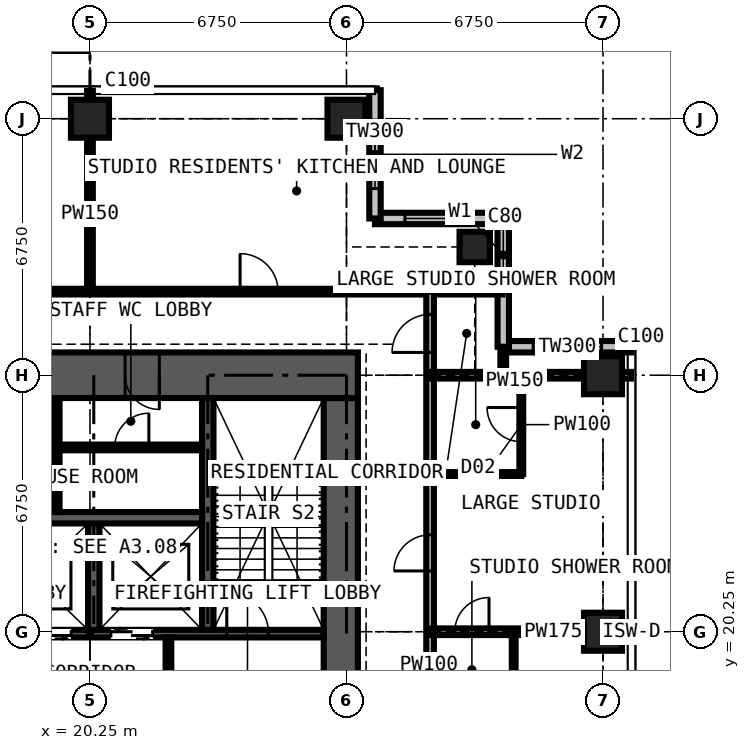
"""IFC4 building model, lengths in metres.
Left out: names, types, materials, properties, quantities, classifications, styles, units other than length and angle.
Written with IfcOpenShell. Run it as: python <this file> out.ifc"""

import sys

from ifc_helpers import new_model, si_unit, direction, frame, frame_2d, origin, origin_2d, place, context, subcontext, project, spatial, rectangle, extrude, element, fill, save


model = new_model("IFC4")
c1 = context("Model", 3, precision=1e-05, world=origin(), true_north=direction((0.0, 1.0)))
c2 = subcontext(c1, "Body", "Model", "MODEL_VIEW")
j1 = project(units=[si_unit("LENGTHUNIT", "METRE"), si_unit("PLANEANGLEUNIT", "RADIAN")], contexts=[c1])
p1 = place(None, origin())
s1 = spatial("IfcSite", under=j1, at=p1, CompositionType="ELEMENT")
p2 = place(p1, origin())
s2 = spatial("IfcBuilding", under=s1, at=p2, CompositionType="ELEMENT")
p3 = place(p2, frame((0.0, 0.0, 229.5)))
s3 = spatial("IfcBuildingStorey", under=s2, at=p3, CompositionType="ELEMENT", Elevation=229.5)
for number, where, z_axis, x_axis in (
    (1, (20.25, 33.75, 0.0), (0.0, 0.0, 1.0), (1.0, 0.0, 0.0)),
    (2, (27.0, 33.75, 0.0), (0.0, 0.0, 1.0), (1.0, 0.0, 0.0)),
):
    element("IfcColumn", number, at=place(p3, frame(where, z_axis=z_axis, x_axis=x_axis)), inside=s3, PredefinedType="COLUMN", context=c2, shape_type="SweptSolid", body=[
        extrude(rectangle(XDim=1.0, YDim=1.0, at=origin_2d()), origin(), (0.0, 0.0, 1.0), 3.6),
    ])
p4 = place(p3, frame((30.375, 30.375, 0.0), z_axis=(0.0, 0.0, 1.0), x_axis=(1.0, 0.0, 0.0)))
e3 = element("IfcColumn", 3, at=p4, inside=s3, PredefinedType="COLUMN", context=c2, shape_type="SweptSolid", body=[
    extrude(rectangle(XDim=0.8, YDim=0.8, at=origin_2d()), origin(), (0.0, 0.0, 1.0), 3.6),
])
for number, where, z_axis, x_axis in (
    (4, (33.75, 20.25, 0.0), (0.0, 0.0, 1.0), (1.0, 0.0, 0.0)),
    (5, (33.75, 27.0, 0.0), (0.0, 0.0, 1.0), (1.0, 0.0, 0.0)),
):
    element("IfcColumn", number, at=place(p3, frame(where, z_axis=z_axis, x_axis=x_axis)), inside=s3, PredefinedType="COLUMN", context=c2, shape_type="SweptSolid", body=[
        extrude(rectangle(XDim=1.0, YDim=1.0, at=origin_2d()), origin(), (0.0, 0.0, 1.0), 3.6),
    ])
p5 = place(p3, frame((26.85, 14.1, 0.0), z_axis=(0.0, 0.0, 1.0), x_axis=(0.0, 1.0, 0.0)))
e6 = element("IfcWall", 6, at=p5, inside=s3, PredefinedType="SHEAR", context=c2, shape_type="SweptSolid", body=[
    extrude(rectangle(XDim=12.3, YDim=0.9, at=frame_2d((6.15, 0.0))), origin(), (0.0, 0.0, 1.0), 3.6),
])
p6 = place(p5, frame((3.65, 0.0, 0.0)))
e7 = element("IfcOpeningElement", 7, at=p6, cuts=e6, PredefinedType="OPENING", context=c2, shape_type="SweptSolid", body=[
    extrude(rectangle(XDim=1.2, YDim=2.2, at=frame_2d((0.6, 1.1))), frame((0.0, 0.46, 0.0), z_axis=(0.0, -1.0, 0.0), x_axis=(1.0, 0.0, 0.0)), (0.0, 0.0, 1.0), 0.92),
])
p7 = place(p3, frame((27.3, 27.0, 0.0), z_axis=(0.0, 0.0, 1.0), x_axis=(-1.0, 0.0, 0.0)))
e8 = element("IfcWall", 8, at=p7, inside=s3, PredefinedType="SHEAR", context=c2, shape_type="SweptSolid", body=[
    extrude(rectangle(XDim=14.1, YDim=1.2, at=frame_2d((7.05, 0.0))), origin(), (0.0, 0.0, 1.0), 3.6),
])
p8 = place(p7, frame((5.225, 0.0, 0.0)))
e9 = element("IfcOpeningElement", 9, at=p8, cuts=e8, PredefinedType="OPENING", context=c2, shape_type="SweptSolid", body=[
    extrude(rectangle(XDim=0.9, YDim=2.2, at=frame_2d((0.45, 1.1))), frame((0.0, 0.61, 0.0), z_axis=(0.0, -1.0, 0.0), x_axis=(1.0, 0.0, 0.0)), (0.0, 0.0, 1.0), 1.22),
])
p9 = place(p7, frame((8.2, 0.0, 0.0)))
e10 = element("IfcOpeningElement", 10, at=p9, cuts=e8, PredefinedType="OPENING", context=c2, shape_type="SweptSolid", body=[
    extrude(rectangle(XDim=1.0, YDim=2.2, at=frame_2d((0.5, 1.1))), frame((0.0, 0.61, 0.0), z_axis=(0.0, -1.0, 0.0), x_axis=(1.0, 0.0, 0.0)), (0.0, 0.0, 1.0), 1.22),
])
p10 = place(p3, frame((34.5, 27.75, 0.0), z_axis=(0.0, 0.0, 1.0), x_axis=(-1.0, 0.0, 0.0)))
e11 = element("IfcWall", 11, at=p10, inside=s3, PredefinedType="SOLIDWALL", context=c2, shape_type="SweptSolid", body=[
    extrude(rectangle(XDim=3.375, YDim=0.3, at=frame_2d((1.688, 0.0))), origin(), (0.0, 0.0, 1.0), 3.375),
])
p11 = place(p10, frame((0.788, 0.0, 0.6)))
e12 = element("IfcOpeningElement", 12, at=p11, cuts=e11, PredefinedType="OPENING", context=c2, shape_type="SweptSolid", body=[
    extrude(rectangle(XDim=1.8, YDim=2.1, at=frame_2d((0.9, 1.05))), frame((0.0, 0.16, 0.0), z_axis=(0.0, -1.0, 0.0), x_axis=(1.0, 0.0, 0.0)), (0.0, 0.0, 1.0), 0.32),
])
p12 = place(p3, frame((31.125, 27.75, 0.0), z_axis=(0.0, 0.0, 1.0), x_axis=(0.0, 1.0, 0.0)))
e13 = element("IfcWall", 13, at=p12, inside=s3, PredefinedType="SOLIDWALL", context=c2, shape_type="SweptSolid", body=[
    extrude(rectangle(XDim=3.375, YDim=0.3, at=frame_2d((1.688, 0.0))), origin(), (0.0, 0.0, 1.0), 3.375),
])
p13 = place(p12, frame((1.663, 0.0, 0.9)))
e14 = element("IfcOpeningElement", 14, at=p13, cuts=e13, PredefinedType="OPENING", context=c2, shape_type="SweptSolid", body=[
    extrude(rectangle(XDim=1.5, YDim=1.8, at=frame_2d((0.75, 0.9))), frame((0.0, 0.16, 0.0), z_axis=(0.0, -1.0, 0.0), x_axis=(1.0, 0.0, 0.0)), (0.0, 0.0, 1.0), 0.32),
])
p14 = place(p3, frame((31.125, 31.125, 0.0), z_axis=(0.0, 0.0, 1.0), x_axis=(-1.0, 0.0, 0.0)))
e15 = element("IfcWall", 15, at=p14, inside=s3, PredefinedType="SOLIDWALL", context=c2, shape_type="SweptSolid", body=[
    extrude(rectangle(XDim=3.375, YDim=0.3, at=frame_2d((1.688, 0.0))), origin(), (0.0, 0.0, 1.0), 3.375),
])
p15 = place(p14, frame((0.788, 0.0, 0.6)))
e16 = element("IfcOpeningElement", 16, at=p15, cuts=e15, PredefinedType="OPENING", context=c2, shape_type="SweptSolid", body=[
    extrude(rectangle(XDim=1.8, YDim=2.1, at=frame_2d((0.9, 1.05))), frame((0.0, 0.16, 0.0), z_axis=(0.0, -1.0, 0.0), x_axis=(1.0, 0.0, 0.0)), (0.0, 0.0, 1.0), 0.32),
])
p16 = place(p3, frame((27.75, 31.125, 0.0), z_axis=(0.0, 0.0, 1.0), x_axis=(0.0, 1.0, 0.0)))
e17 = element("IfcWall", 17, at=p16, inside=s3, PredefinedType="SOLIDWALL", context=c2, shape_type="SweptSolid", body=[
    extrude(rectangle(XDim=3.375, YDim=0.3, at=frame_2d((1.688, 0.0))), origin(), (0.0, 0.0, 1.0), 3.375),
])
p17 = place(p16, frame((0.788, 0.0, 0.6)))
e18 = element("IfcOpeningElement", 18, at=p17, cuts=e17, PredefinedType="OPENING", context=c2, shape_type="SweptSolid", body=[
    extrude(rectangle(XDim=1.8, YDim=2.1, at=frame_2d((0.9, 1.05))), frame((0.0, 0.16, 0.0), z_axis=(0.0, -1.0, 0.0), x_axis=(1.0, 0.0, 0.0)), (0.0, 0.0, 1.0), 0.32),
])
p18 = place(p3, frame((14.1, 20.2, 0.0), z_axis=(0.0, 0.0, 1.0), x_axis=(1.0, 0.0, 0.0)))
e19 = element("IfcWall", 19, at=p18, inside=s3, PredefinedType="SHEAR", context=c2, shape_type="SweptSolid", body=[
    extrude(rectangle(XDim=12.3, YDim=0.2, at=frame_2d((6.15, 0.0))), origin(), (0.0, 0.0, 1.0), 3.6),
])
p19 = place(p18, frame((4.56, 0.0, 0.0)))
e20 = element("IfcOpeningElement", 20, at=p19, cuts=e19, PredefinedType="OPENING", context=c2, shape_type="SweptSolid", body=[
    extrude(rectangle(XDim=1.1, YDim=2.2, at=frame_2d((0.55, 1.1))), frame((0.0, 0.11, 0.0), z_axis=(0.0, -1.0, 0.0), x_axis=(1.0, 0.0, 0.0)), (0.0, 0.0, 1.0), 0.22),
])
p20 = place(p18, frame((6.7, 0.0, 0.0)))
e21 = element("IfcOpeningElement", 21, at=p20, cuts=e19, PredefinedType="OPENING", context=c2, shape_type="SweptSolid", body=[
    extrude(rectangle(XDim=1.1, YDim=2.2, at=frame_2d((0.55, 1.1))), frame((0.0, 0.11, 0.0), z_axis=(0.0, -1.0, 0.0), x_axis=(1.0, 0.0, 0.0)), (0.0, 0.0, 1.0), 0.22),
])
p21 = place(p18, frame((0.35, 0.0, 0.0)))
e22 = element("IfcOpeningElement", 22, at=p21, cuts=e19, PredefinedType="OPENING", context=c2, shape_type="SweptSolid", body=[
    extrude(rectangle(XDim=1.1, YDim=2.2, at=frame_2d((0.55, 1.1))), frame((0.0, 0.11, 0.0), z_axis=(0.0, -1.0, 0.0), x_axis=(1.0, 0.0, 0.0)), (0.0, 0.0, 1.0), 0.22),
])
p22 = place(p18, frame((9.75, 0.0, 0.0)))
e23 = element("IfcOpeningElement", 23, at=p22, cuts=e19, PredefinedType="OPENING", context=c2, shape_type="SweptSolid", body=[
    extrude(rectangle(XDim=1.1, YDim=2.2, at=frame_2d((0.55, 1.1))), frame((0.0, 0.11, 0.0), z_axis=(0.0, -1.0, 0.0), x_axis=(1.0, 0.0, 0.0)), (0.0, 0.0, 1.0), 0.22),
])
p23 = place(p3, frame((23.35, 20.3, 0.0), z_axis=(0.0, 0.0, 1.0), x_axis=(0.0, 1.0, 0.0)))
e24 = element("IfcWall", 24, at=p23, inside=s3, PredefinedType="SHEAR", context=c2, shape_type="SweptSolid", body=[
    extrude(rectangle(XDim=6.1, YDim=0.3, at=frame_2d((3.05, 0.0))), origin(), (0.0, 0.0, 1.0), 3.6),
])
p24 = place(p3, frame((20.35, 20.3, 0.0), z_axis=(0.0, 0.0, 1.0), x_axis=(0.0, 1.0, 0.0)))
e25 = element("IfcWall", 25, at=p24, inside=s3, PredefinedType="SHEAR", context=c2, shape_type="SweptSolid", body=[
    extrude(rectangle(XDim=2.8, YDim=0.3, at=frame_2d((1.4, 0.0))), origin(), (0.0, 0.0, 1.0), 3.6),
])
p25 = place(p3, frame((17.3, 23.25, 0.0), z_axis=(0.0, 0.0, 1.0), x_axis=(1.0, 0.0, 0.0)))
e26 = element("IfcWall", 26, at=p25, inside=s3, PredefinedType="SHEAR", context=c2, shape_type="SweptSolid", body=[
    extrude(rectangle(XDim=5.9, YDim=0.3, at=frame_2d((2.95, 0.0))), origin(), (0.0, 0.0, 1.0), 3.6),
])
p26 = place(p3, frame((22.315, 16.6, 0.0), z_axis=(0.0, 0.0, 1.0), x_axis=(0.0, 1.0, 0.0)))
e27 = element("IfcWall", 27, at=p26, inside=s3, PredefinedType="PARTITIONING", context=c2, shape_type="SweptSolid", body=[
    extrude(rectangle(XDim=3.5, YDim=0.15, at=frame_2d((1.75, 0.0))), origin(), (0.0, 0.0, 1.0), 3.375),
])
p27 = place(p26, frame((1.15, 0.0, 0.0)))
e28 = element("IfcOpeningElement", 28, at=p27, cuts=e27, PredefinedType="OPENING", context=c2, shape_type="SweptSolid", body=[
    extrude(rectangle(XDim=1.2, YDim=2.2, at=frame_2d((0.6, 1.1))), frame((0.0, 0.085, 0.0), z_axis=(0.0, -1.0, 0.0), x_axis=(1.0, 0.0, 0.0)), (0.0, 0.0, 1.0), 0.17),
])
p28 = place(p3, frame((19.375, 23.4, 0.0), z_axis=(0.0, 0.0, 1.0), x_axis=(0.0, 1.0, 0.0)))
e29 = element("IfcWall", 29, at=p28, inside=s3, PredefinedType="PARTITIONING", context=c2, shape_type="SweptSolid", body=[
    extrude(rectangle(XDim=3.0, YDim=0.15, at=frame_2d((1.5, 0.0))), origin(), (0.0, 0.0, 1.0), 3.375),
])
p29 = place(p3, frame((19.45, 25.1, 0.0), z_axis=(0.0, 0.0, 1.0), x_axis=(1.0, 0.0, 0.0)))
e30 = element("IfcWall", 30, at=p29, inside=s3, PredefinedType="PARTITIONING", context=c2, shape_type="SweptSolid", body=[
    extrude(rectangle(XDim=3.75, YDim=0.15, at=frame_2d((1.875, 0.0))), origin(), (0.0, 0.0, 1.0), 3.375),
])
p30 = place(p29, frame((1.45, 0.0, 0.0)))
e31 = element("IfcOpeningElement", 31, at=p30, cuts=e30, PredefinedType="OPENING", context=c2, shape_type="SweptSolid", body=[
    extrude(rectangle(XDim=0.9, YDim=2.2, at=frame_2d((0.45, 1.1))), frame((0.0, 0.085, 0.0), z_axis=(0.0, -1.0, 0.0), x_axis=(1.0, 0.0, 0.0)), (0.0, 0.0, 1.0), 0.17),
])
p31 = place(p3, frame((11.3, 29.2, 0.0), z_axis=(0.0, 0.0, 1.0), x_axis=(1.0, 0.0, 0.0)))
e32 = element("IfcWall", 32, at=p31, inside=s3, PredefinedType="PARTITIONING", context=c2, shape_type="SweptSolid", body=[
    extrude(rectangle(XDim=19.809, YDim=0.15, at=frame_2d((9.904, 0.0))), origin(), (0.0, 0.0, 1.0), 3.375),
])
p32 = place(p31, frame((12.9, 0.0, 0.0)))
e33 = element("IfcOpeningElement", 33, at=p32, cuts=e32, PredefinedType="OPENING", context=c2, shape_type="SweptSolid", body=[
    extrude(rectangle(XDim=1.0, YDim=2.2, at=frame_2d((0.5, 1.1))), frame((0.0, 0.085, 0.0), z_axis=(0.0, -1.0, 0.0), x_axis=(1.0, 0.0, 0.0)), (0.0, 0.0, 1.0), 0.17),
])
p33 = place(p31, frame((6.4, 0.0, 0.0)))
e34 = element("IfcOpeningElement", 34, at=p33, cuts=e32, PredefinedType="OPENING", context=c2, shape_type="SweptSolid", body=[
    extrude(rectangle(XDim=0.95, YDim=2.2, at=frame_2d((0.475, 1.1))), frame((0.0, 0.085, 0.0), z_axis=(0.0, -1.0, 0.0), x_axis=(1.0, 0.0, 0.0)), (0.0, 0.0, 1.0), 0.17),
])
p34 = place(p31, frame((0.6, 0.0, 0.0)))
e35 = element("IfcOpeningElement", 35, at=p34, cuts=e32, PredefinedType="OPENING", context=c2, shape_type="SweptSolid", body=[
    extrude(rectangle(XDim=1.0, YDim=2.2, at=frame_2d((0.5, 1.1))), frame((0.0, 0.085, 0.0), z_axis=(0.0, -1.0, 0.0), x_axis=(1.0, 0.0, 0.0)), (0.0, 0.0, 1.0), 0.17),
])
p35 = place(p3, frame((20.25, 29.2, 0.0), z_axis=(0.0, 0.0, 1.0), x_axis=(0.0, 1.0, 0.0)))
e36 = element("IfcWall", 36, at=p35, inside=s3, PredefinedType="PARTITIONING", context=c2, shape_type="SweptSolid", body=[
    extrude(rectangle(XDim=5.284, YDim=0.15, at=frame_2d((2.642, 0.0))), origin(), (0.0, 0.0, 1.0), 2.61),
])
p36 = place(p3, frame((29.2, 11.3, 0.0), z_axis=(0.0, 0.0, 1.0), x_axis=(0.0, 1.0, 0.0)))
e37 = element("IfcWall", 37, at=p36, inside=s3, PredefinedType="PARTITIONING", context=c2, shape_type="SweptSolid", body=[
    extrude(rectangle(XDim=17.9, YDim=0.2, at=frame_2d((8.95, 0.0))), origin(), (0.0, 0.0, 1.0), 3.375),
])
p37 = place(p36, frame((2.3, 0.0, 0.0)))
e38 = element("IfcOpeningElement", 38, at=p37, cuts=e37, PredefinedType="OPENING", context=c2, shape_type="SweptSolid", body=[
    extrude(rectangle(XDim=1.0, YDim=2.2, at=frame_2d((0.5, 1.1))), frame((0.0, 0.11, 0.0), z_axis=(0.0, -1.0, 0.0), x_axis=(1.0, 0.0, 0.0)), (0.0, 0.0, 1.0), 0.22),
])
p38 = place(p36, frame((10.55, 0.0, 0.0)))
e39 = element("IfcOpeningElement", 39, at=p38, cuts=e37, PredefinedType="OPENING", context=c2, shape_type="SweptSolid", body=[
    extrude(rectangle(XDim=0.95, YDim=2.2, at=frame_2d((0.475, 1.1))), frame((0.0, 0.11, 0.0), z_axis=(0.0, -1.0, 0.0), x_axis=(1.0, 0.0, 0.0)), (0.0, 0.0, 1.0), 0.22),
])
p39 = place(p36, frame((5.775, 0.0, 0.0)))
e40 = element("IfcOpeningElement", 40, at=p39, cuts=e37, PredefinedType="OPENING", context=c2, shape_type="SweptSolid", body=[
    extrude(rectangle(XDim=0.95, YDim=2.2, at=frame_2d((0.475, 1.1))), frame((0.0, 0.11, 0.0), z_axis=(0.0, -1.0, 0.0), x_axis=(1.0, 0.0, 0.0)), (0.0, 0.0, 1.0), 0.22),
])
p40 = place(p36, frame((16.3, 0.0, 0.0)))
e41 = element("IfcOpeningElement", 41, at=p40, cuts=e37, PredefinedType="OPENING", context=c2, shape_type="SweptSolid", body=[
    extrude(rectangle(XDim=1.0, YDim=2.2, at=frame_2d((0.5, 1.1))), frame((0.0, 0.11, 0.0), z_axis=(0.0, -1.0, 0.0), x_axis=(1.0, 0.0, 0.0)), (0.0, 0.0, 1.0), 0.22),
])
p41 = place(p3, frame((29.2, 20.25, 0.0), z_axis=(0.0, 0.0, 1.0), x_axis=(1.0, 0.0, 0.0)))
e42 = element("IfcWall", 42, at=p41, inside=s3, PredefinedType="PARTITIONING", context=c2, shape_type="SweptSolid", body=[
    extrude(rectangle(XDim=5.284, YDim=0.175, at=frame_2d((2.642, 0.0))), origin(), (0.0, 0.0, 1.0), 2.877),
])
p42 = place(p41, frame((0.65, 0.0, 0.0)))
e43 = element("IfcOpeningElement", 43, at=p42, cuts=e42, PredefinedType="OPENING", context=c2, shape_type="SweptSolid", body=[
    extrude(rectangle(XDim=0.9, YDim=2.2, at=frame_2d((0.45, 1.1))), frame((0.0, 0.097, 0.0), z_axis=(0.0, -1.0, 0.0), x_axis=(1.0, 0.0, 0.0)), (0.0, 0.0, 1.0), 0.195),
])
p43 = place(p3, frame((29.2, 24.4, 0.0), z_axis=(0.0, 0.0, 1.0), x_axis=(1.0, 0.0, 0.0)))
e44 = element("IfcWall", 44, at=p43, inside=s3, PredefinedType="PARTITIONING", context=c2, shape_type="SweptSolid", body=[
    extrude(rectangle(XDim=2.4, YDim=0.1, at=frame_2d((1.2, 0.0))), origin(), (0.0, 0.0, 1.0), 3.375),
])
p44 = place(p3, frame((29.2, 27.0, 0.0), z_axis=(0.0, 0.0, 1.0), x_axis=(1.0, 0.0, 0.0)))
e45 = element("IfcWall", 45, at=p44, inside=s3, PredefinedType="PARTITIONING", context=c2, shape_type="SweptSolid", body=[
    extrude(rectangle(XDim=5.284, YDim=0.175, at=frame_2d((2.642, 0.0))), origin(), (0.0, 0.0, 1.0), 2.877),
])
p45 = place(p3, frame((31.125, 27.0, 0.0), z_axis=(0.0, 0.0, 1.0), x_axis=(0.0, 1.0, 0.0)))
e46 = element("IfcWall", 46, at=p45, inside=s3, PredefinedType="PARTITIONING", context=c2, shape_type="SweptSolid", body=[
    extrude(rectangle(XDim=0.734, YDim=0.15, at=frame_2d((0.367, 0.0))), origin(), (0.0, 0.0, 1.0), 3.375),
])
p46 = place(p3, frame((31.4, 18.25, 0.0), z_axis=(0.0, 0.0, 1.0), x_axis=(0.0, 1.0, 0.0)))
e47 = element("IfcWall", 47, at=p46, inside=s3, PredefinedType="PARTITIONING", context=c2, shape_type="SweptSolid", body=[
    extrude(rectangle(XDim=2.0, YDim=0.1, at=frame_2d((1.0, 0.0))), origin(), (0.0, 0.0, 1.0), 3.375),
])
p47 = place(p3, frame((31.6, 24.4, 0.0), z_axis=(0.0, 0.0, 1.0), x_axis=(0.0, 1.0, 0.0)))
e48 = element("IfcWall", 48, at=p47, inside=s3, PredefinedType="PARTITIONING", context=c2, shape_type="SweptSolid", body=[
    extrude(rectangle(XDim=2.6, YDim=0.1, at=frame_2d((1.3, 0.0))), origin(), (0.0, 0.0, 1.0), 3.375),
])
p48 = place(p47, frame((0.85, 0.0, 0.0)))
e49 = element("IfcOpeningElement", 49, at=p48, cuts=e48, PredefinedType="OPENING", context=c2, shape_type="SweptSolid", body=[
    extrude(rectangle(XDim=0.9, YDim=2.2, at=frame_2d((0.45, 1.1))), frame((0.0, 0.06, 0.0), z_axis=(0.0, -1.0, 0.0), x_axis=(1.0, 0.0, 0.0)), (0.0, 0.0, 1.0), 0.12),
])
p49 = place(p11, origin())
e50 = element("IfcWindow", 50, at=p49, inside=s3, PartitioningType="SINGLE_PANEL", PredefinedType="WINDOW", context=c2, shape_type="SweptSolid", body=[
    extrude(rectangle(XDim=1.8, YDim=2.1, at=frame_2d((0.9, 1.05))), frame((0.0, 0.03, 0.0), z_axis=(0.0, -1.0, 0.0), x_axis=(1.0, 0.0, 0.0)), (0.0, 0.0, 1.0), 0.06),
])
fill(e12, e50)
p50 = place(p13, origin())
e51 = element("IfcWindow", 51, at=p50, inside=s3, PartitioningType="SINGLE_PANEL", PredefinedType="WINDOW", context=c2, shape_type="SweptSolid", body=[
    extrude(rectangle(XDim=1.5, YDim=1.8, at=frame_2d((0.75, 0.9))), frame((0.0, 0.03, 0.0), z_axis=(0.0, -1.0, 0.0), x_axis=(1.0, 0.0, 0.0)), (0.0, 0.0, 1.0), 0.06),
])
fill(e14, e51)
p51 = place(p15, origin())
e52 = element("IfcWindow", 52, at=p51, inside=s3, PartitioningType="SINGLE_PANEL", PredefinedType="WINDOW", context=c2, shape_type="SweptSolid", body=[
    extrude(rectangle(XDim=1.8, YDim=2.1, at=frame_2d((0.9, 1.05))), frame((0.0, 0.03, 0.0), z_axis=(0.0, -1.0, 0.0), x_axis=(1.0, 0.0, 0.0)), (0.0, 0.0, 1.0), 0.06),
])
fill(e16, e52)
p52 = place(p17, origin())
e53 = element("IfcWindow", 53, at=p52, inside=s3, PartitioningType="SINGLE_PANEL", PredefinedType="WINDOW", context=c2, shape_type="SweptSolid", body=[
    extrude(rectangle(XDim=1.8, YDim=2.1, at=frame_2d((0.9, 1.05))), frame((0.0, 0.03, 0.0), z_axis=(0.0, -1.0, 0.0), x_axis=(1.0, 0.0, 0.0)), (0.0, 0.0, 1.0), 0.06),
])
fill(e18, e53)
p53 = place(p19, origin())
e54 = element("IfcDoor", 54, at=p53, inside=s3, OperationType="DOUBLE_DOOR_SLIDING", PredefinedType="DOOR", context=c2, shape_type="SweptSolid", body=[
    extrude(rectangle(XDim=1.1, YDim=2.2, at=frame_2d((0.55, 1.1))), frame((0.0, 0.025, 0.0), z_axis=(0.0, -1.0, 0.0), x_axis=(1.0, 0.0, 0.0)), (0.0, 0.0, 1.0), 0.05),
])
fill(e20, e54)
p54 = place(p20, origin())
e55 = element("IfcDoor", 55, at=p54, inside=s3, OperationType="DOUBLE_DOOR_SLIDING", PredefinedType="DOOR", context=c2, shape_type="SweptSolid", body=[
    extrude(rectangle(XDim=1.1, YDim=2.2, at=frame_2d((0.55, 1.1))), frame((0.0, 0.025, 0.0), z_axis=(0.0, -1.0, 0.0), x_axis=(1.0, 0.0, 0.0)), (0.0, 0.0, 1.0), 0.05),
])
fill(e21, e55)
p55 = place(p30, origin())
e56 = element("IfcDoor", 56, at=p55, inside=s3, OperationType="SINGLE_SWING_RIGHT", PredefinedType="DOOR", context=c2, shape_type="SweptSolid", body=[
    extrude(rectangle(XDim=0.9, YDim=2.2, at=frame_2d((0.45, 1.1))), frame((0.0, 0.025, 0.0), z_axis=(0.0, -1.0, 0.0), x_axis=(1.0, 0.0, 0.0)), (0.0, 0.0, 1.0), 0.05),
])
fill(e31, e56)
p56 = place(p8, origin())
e57 = element("IfcDoor", 57, at=p56, inside=s3, OperationType="SINGLE_SWING_LEFT", PredefinedType="DOOR", context=c2, shape_type="SweptSolid", body=[
    extrude(rectangle(XDim=0.9, YDim=2.2, at=frame_2d((0.45, 1.1))), frame((0.0, 0.4, 0.0), z_axis=(0.0, -1.0, 0.0), x_axis=(1.0, 0.0, 0.0)), (0.0, 0.0, 1.0), 0.8),
])
fill(e9, e57)
p57 = place(p22, origin())
e58 = element("IfcDoor", 58, at=p57, inside=s3, OperationType="SINGLE_SWING_LEFT", PredefinedType="DOOR", context=c2, shape_type="SweptSolid", body=[
    extrude(rectangle(XDim=1.1, YDim=2.2, at=frame_2d((0.55, 1.1))), frame((0.0, 0.025, 0.0), z_axis=(0.0, -1.0, 0.0), x_axis=(1.0, 0.0, 0.0)), (0.0, 0.0, 1.0), 0.05),
])
fill(e23, e58)
p58 = place(p38, origin())
e59 = element("IfcDoor", 59, at=p58, inside=s3, OperationType="SINGLE_SWING_LEFT", PredefinedType="DOOR", context=c2, shape_type="SweptSolid", body=[
    extrude(rectangle(XDim=0.95, YDim=2.2, at=frame_2d((0.475, 1.1))), frame((0.0, 0.025, 0.0), z_axis=(0.0, -1.0, 0.0), x_axis=(1.0, 0.0, 0.0)), (0.0, 0.0, 1.0), 0.05),
])
fill(e39, e59)
p59 = place(p48, origin())
e60 = element("IfcDoor", 60, at=p59, inside=s3, OperationType="SINGLE_SWING_RIGHT", PredefinedType="DOOR", context=c2, shape_type="SweptSolid", body=[
    extrude(rectangle(XDim=0.9, YDim=2.2, at=frame_2d((0.45, 1.1))), frame((0.0, 0.025, 0.0), z_axis=(0.0, -1.0, 0.0), x_axis=(1.0, 0.0, 0.0)), (0.0, 0.0, 1.0), 0.05),
])
fill(e49, e60)
p60 = place(p42, origin())
e61 = element("IfcDoor", 61, at=p60, inside=s3, OperationType="SINGLE_SWING_RIGHT", PredefinedType="DOOR", context=c2, shape_type="SweptSolid", body=[
    extrude(rectangle(XDim=0.9, YDim=2.2, at=frame_2d((0.45, 1.1))), frame((0.0, 0.025, 0.0), z_axis=(0.0, -1.0, 0.0), x_axis=(1.0, 0.0, 0.0)), (0.0, 0.0, 1.0), 0.05),
])
fill(e43, e61)
p61 = place(p40, origin())
e62 = element("IfcDoor", 62, at=p61, inside=s3, OperationType="SINGLE_SWING_LEFT", PredefinedType="DOOR", context=c2, shape_type="SweptSolid", body=[
    extrude(rectangle(XDim=1.0, YDim=2.2, at=frame_2d((0.5, 1.1))), frame((0.0, 0.025, 0.0), z_axis=(0.0, -1.0, 0.0), x_axis=(1.0, 0.0, 0.0)), (0.0, 0.0, 1.0), 0.05),
])
fill(e41, e62)
p62 = place(p32, origin())
e63 = element("IfcDoor", 63, at=p62, inside=s3, OperationType="SINGLE_SWING_LEFT", PredefinedType="DOOR", context=c2, shape_type="SweptSolid", body=[
    extrude(rectangle(XDim=1.0, YDim=2.2, at=frame_2d((0.5, 1.1))), frame((0.0, 0.025, 0.0), z_axis=(0.0, -1.0, 0.0), x_axis=(1.0, 0.0, 0.0)), (0.0, 0.0, 1.0), 0.05),
])
fill(e33, e63)
save(model, sys.argv[1])
